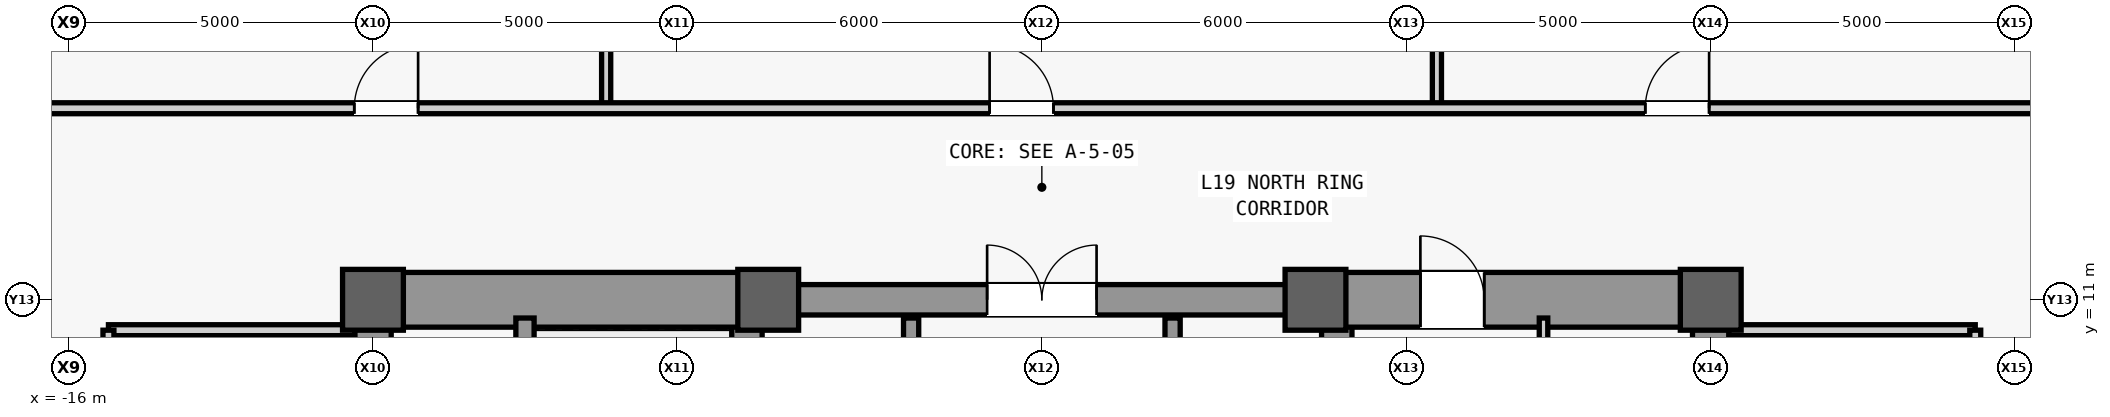
"""IFC4 building model, lengths in metres.
Left out: names, types, materials, properties, quantities, classifications, styles, units other than length and angle.
Written with IfcOpenShell. Run it as: python <this file> out.ifc"""

import sys

from ifc_helpers import new_model, si_unit, direction, frame, frame_2d, origin, origin_2d, place, context, subcontext, project, spatial, rectangle, extrude, source, transform, mapped, element, fill, save


model = new_model("IFC4")
c1 = context("Model", 3, precision=1e-05, world=origin(), true_north=direction((0.0, 1.0)))
c2 = subcontext(c1, "Body", "Model", "MODEL_VIEW")
j1 = project(units=[si_unit("LENGTHUNIT", "METRE"), si_unit("PLANEANGLEUNIT", "RADIAN")], contexts=[c1])
p1 = place(None, origin())
s1 = spatial("IfcSite", under=j1, at=p1, CompositionType="ELEMENT")
p2 = place(p1, origin())
s2 = spatial("IfcBuilding", under=s1, at=p2, CompositionType="ELEMENT")
p3 = place(p2, frame((0.0, 0.0, 87.2)))
s3 = spatial("IfcBuildingStorey", under=s2, at=p3, CompositionType="ELEMENT", Elevation=87.2)
m1 = source(origin(), c2, "Body", "SweptSolid", [
    extrude(rectangle(XDim=22.0, YDim=0.6, at=frame_2d((11.0, 0.0))), origin(), (0.0, 0.0, 1.0), 3.94),
])
p4 = place(p3, frame((-11.0, -11.0, 0.0), z_axis=(0.0, 0.0, 1.0), x_axis=(0.0, 1.0, 0.0)))
e1 = element("IfcWall", 1, at=p4, inside=s3, PredefinedType="SHEAR", context=c2, shape_type="MappedRepresentation", body=[
    mapped(m1, transform((0.0, 0.0, 0.0), scale=1.0)),
])
m2 = source(origin(), c2, "Body", "SweptSolid", [
    extrude(rectangle(XDim=1.1, YDim=2.2, at=frame_2d((0.55, 1.1))), frame((0.0, 0.31, 0.0), z_axis=(0.0, -1.0, 0.0), x_axis=(1.0, 0.0, 0.0)), (0.0, 0.0, 1.0), 0.62),
])
p5 = place(p4, frame((0.8, 0.0, 0.0)))
e2 = element("IfcOpeningElement", 2, at=p5, cuts=e1, PredefinedType="OPENING", context=c2, shape_type="MappedRepresentation", body=[
    mapped(m2, transform((0.0, 0.0, 0.0), scale=1.0)),
])
p6 = place(p4, frame((12.5, 0.0, 0.0)))
e3 = element("IfcOpeningElement", 3, at=p6, cuts=e1, PredefinedType="OPENING", context=c2, shape_type="MappedRepresentation", body=[
    mapped(m2, transform((0.0, 0.0, 0.0), scale=1.0)),
])
m3 = source(origin(), c2, "Body", "SweptSolid", [
    extrude(rectangle(XDim=0.9, YDim=2.15, at=frame_2d((0.45, 1.075))), frame((0.0, 0.31, 0.0), z_axis=(0.0, -1.0, 0.0), x_axis=(1.0, 0.0, 0.0)), (0.0, 0.0, 1.0), 0.62),
])
p7 = place(p4, frame((6.85, 0.0, 0.0)))
e4 = element("IfcOpeningElement", 4, at=p7, cuts=e1, PredefinedType="OPENING", context=c2, shape_type="MappedRepresentation", body=[
    mapped(m3, transform((0.0, 0.0, 0.0), scale=1.0)),
])
m4 = source(origin(), c2, "Body", "SweptSolid", [
    extrude(rectangle(XDim=1.3, YDim=2.3, at=frame_2d((0.65, 1.15))), frame((0.0, 0.31, 0.0), z_axis=(0.0, -1.0, 0.0), x_axis=(1.0, 0.0, 0.0)), (0.0, 0.0, 1.0), 0.62),
])
p8 = place(p4, frame((2.7, 0.0, 0.0)))
e5 = element("IfcOpeningElement", 5, at=p8, cuts=e1, PredefinedType="OPENING", context=c2, shape_type="MappedRepresentation", body=[
    mapped(m4, transform((0.0, 0.0, 0.0), scale=1.0)),
])
p9 = place(p3, frame((11.0, -11.0, 0.0), z_axis=(0.0, 0.0, 1.0), x_axis=(0.0, 1.0, 0.0)))
e6 = element("IfcWall", 6, at=p9, inside=s3, PredefinedType="SHEAR", context=c2, shape_type="MappedRepresentation", body=[
    mapped(m1, transform((0.0, 0.0, 0.0), scale=1.0)),
])
p10 = place(p9, frame((0.8, 0.0, 0.0)))
e7 = element("IfcOpeningElement", 7, at=p10, cuts=e6, PredefinedType="OPENING", context=c2, shape_type="MappedRepresentation", body=[
    mapped(m2, transform((0.0, 0.0, 0.0), scale=1.0)),
])
p11 = place(p9, frame((6.2, 0.0, 0.0)))
e8 = element("IfcOpeningElement", 8, at=p11, cuts=e6, PredefinedType="OPENING", context=c2, shape_type="MappedRepresentation", body=[
    mapped(m3, transform((0.0, 0.0, 0.0), scale=1.0)),
])
p12 = place(p9, frame((8.05, 0.0, 0.0)))
e9 = element("IfcOpeningElement", 9, at=p12, cuts=e6, PredefinedType="OPENING", context=c2, shape_type="MappedRepresentation", body=[
    mapped(m3, transform((0.0, 0.0, 0.0), scale=1.0)),
])
p13 = place(p9, frame((2.7, 0.0, 0.0)))
e10 = element("IfcOpeningElement", 10, at=p13, cuts=e6, PredefinedType="OPENING", context=c2, shape_type="MappedRepresentation", body=[
    mapped(m4, transform((0.0, 0.0, 0.0), scale=1.0)),
])
p14 = place(p9, frame((13.35, 0.0, 0.0)))
e11 = element("IfcOpeningElement", 11, at=p14, cuts=e6, PredefinedType="OPENING", context=c2, shape_type="MappedRepresentation", body=[
    mapped(m4, transform((0.0, 0.0, 0.0), scale=1.0)),
])
m5 = source(origin(), c2, "Body", "SweptSolid", [
    extrude(rectangle(XDim=21.4, YDim=0.5, at=frame_2d((10.7, 0.0))), origin(), (0.0, 0.0, 1.0), 3.94),
])
for number, where, z_axis, x_axis in (
    (12, (-4.85, -10.7, 0.0), (0.0, 0.0, 1.0), (0.0, 1.0, 0.0)),
    (13, (4.85, -10.7, 0.0), (0.0, 0.0, 1.0), (0.0, 1.0, 0.0)),
):
    element("IfcWall", number, at=place(p3, frame(where, z_axis=z_axis, x_axis=x_axis)), inside=s3, PredefinedType="SHEAR", context=c2, shape_type="MappedRepresentation", body=[
        mapped(m5, transform((0.0, 0.0, 0.0), scale=1.0)),
    ])
m6 = source(origin(), c2, "Body", "SweptSolid", [
    extrude(rectangle(XDim=5.85, YDim=0.9, at=frame_2d((2.925, 0.0))), origin(), (0.0, 0.0, 1.0), 3.94),
])
p15 = place(p3, frame((-10.7, 11.0, 0.0), z_axis=(0.0, 0.0, 1.0), x_axis=(1.0, 0.0, 0.0)))
e14 = element("IfcWall", 14, at=p15, inside=s3, PredefinedType="SHEAR", context=c2, shape_type="MappedRepresentation", body=[
    mapped(m6, transform((0.0, 0.0, 0.0), scale=1.0)),
])
p16 = place(p3, frame((4.85, 11.0, 0.0), z_axis=(0.0, 0.0, 1.0), x_axis=(1.0, 0.0, 0.0)))
e15 = element("IfcWall", 15, at=p16, inside=s3, PredefinedType="SHEAR", context=c2, shape_type="MappedRepresentation", body=[
    mapped(m6, transform((0.0, 0.0, 0.0), scale=1.0)),
])
m7 = source(origin(), c2, "Body", "SweptSolid", [
    extrude(rectangle(XDim=1.05, YDim=2.2, at=frame_2d((0.525, 1.1))), frame((0.0, 0.46, 0.0), z_axis=(0.0, -1.0, 0.0), x_axis=(1.0, 0.0, 0.0)), (0.0, 0.0, 1.0), 0.92),
])
p17 = place(p16, frame((1.375, 0.0, 0.0)))
e16 = element("IfcOpeningElement", 16, at=p17, cuts=e15, PredefinedType="OPENING", context=c2, shape_type="MappedRepresentation", body=[
    mapped(m7, transform((0.0, 0.0, 0.0), scale=1.0)),
])
m8 = source(origin(), c2, "Body", "SweptSolid", [
    extrude(rectangle(XDim=9.2, YDim=0.5, at=frame_2d((4.6, 0.0))), origin(), (0.0, 0.0, 1.0), 3.94),
])
p18 = place(p3, frame((-4.6, 11.0, 0.0), z_axis=(0.0, 0.0, 1.0), x_axis=(1.0, 0.0, 0.0)))
e17 = element("IfcWall", 17, at=p18, inside=s3, PredefinedType="SHEAR", context=c2, shape_type="MappedRepresentation", body=[
    mapped(m8, transform((0.0, 0.0, 0.0), scale=1.0)),
])
m9 = source(origin(), c2, "Body", "SweptSolid", [
    extrude(rectangle(XDim=1.8, YDim=2.25, at=frame_2d((0.9, 1.125))), frame((0.0, 0.26, 0.0), z_axis=(0.0, -1.0, 0.0), x_axis=(1.0, 0.0, 0.0)), (0.0, 0.0, 1.0), 0.52),
])
p19 = place(p18, frame((3.7, 0.0, 0.0)))
e18 = element("IfcOpeningElement", 18, at=p19, cuts=e17, PredefinedType="OPENING", context=c2, shape_type="MappedRepresentation", body=[
    mapped(m9, transform((0.0, 0.0, 0.0), scale=1.0)),
])
m10 = source(origin(), c2, "Body", "SweptSolid", [
    extrude(rectangle(XDim=1.0, YDim=1.0, at=origin_2d()), origin(), (0.0, 0.0, 1.0), 4.2),
])
for number, where, z_axis, x_axis in (
    (19, (-11.0, 11.0, 0.0), (0.0, 0.0, 1.0), (1.0, 0.0, 0.0)),
    (20, (-4.5, 11.0, 0.0), (0.0, 0.0, 1.0), (1.0, 0.0, 0.0)),
    (21, (4.5, 11.0, 0.0), (0.0, 0.0, 1.0), (1.0, 0.0, 0.0)),
    (22, (11.0, 11.0, 0.0), (0.0, 0.0, 1.0), (1.0, 0.0, 0.0)),
):
    element("IfcColumn", number, at=place(p3, frame(where, z_axis=z_axis, x_axis=x_axis)), inside=s3, PredefinedType="COLUMN", context=c2, shape_type="MappedRepresentation", body=[
        mapped(m10, transform((0.0, 0.0, 0.0), scale=1.0)),
    ])
m11 = source(origin(), c2, "Body", "SweptSolid", [
    extrude(rectangle(XDim=7.75, YDim=0.3, at=frame_2d((3.875, 0.0))), origin(), (0.0, 0.0, 1.0), 3.94),
])
p20 = place(p3, frame((-8.5, 2.95, 0.0), z_axis=(0.0, 0.0, 1.0), x_axis=(0.0, 1.0, 0.0)))
e23 = element("IfcWall", 23, at=p20, inside=s3, PredefinedType="SHEAR", context=c2, shape_type="MappedRepresentation", body=[
    mapped(m11, transform((0.0, 0.0, 0.0), scale=1.0)),
])
m12 = source(origin(), c2, "Body", "SweptSolid", [
    extrude(rectangle(XDim=9.4, YDim=0.14, at=frame_2d((4.7, 0.0))), origin(), (0.0, 0.0, 1.0), 3.94),
])
p21 = place(p3, frame((8.25, 1.3, 0.0), z_axis=(0.0, 0.0, 1.0), x_axis=(0.0, 1.0, 0.0)))
e24 = element("IfcWall", 24, at=p21, inside=s3, PredefinedType="PARTITIONING", context=c2, shape_type="MappedRepresentation", body=[
    mapped(m12, transform((0.0, 0.0, 0.0), scale=1.0)),
])
m13 = source(origin(), c2, "Body", "SweptSolid", [
    extrude(rectangle(XDim=4.05, YDim=0.18, at=frame_2d((2.025, 0.0))), origin(), (0.0, 0.0, 1.0), 3.94),
])
p22 = place(p3, frame((-15.35, 10.5, 0.0), z_axis=(0.0, 0.0, 1.0), x_axis=(1.0, 0.0, 0.0)))
e25 = element("IfcWall", 25, at=p22, inside=s3, PredefinedType="PARTITIONING", context=c2, shape_type="MappedRepresentation", body=[
    mapped(m13, transform((0.0, 0.0, 0.0), scale=1.0)),
])
m14 = source(origin(), c2, "Body", "SweptSolid", [
    extrude(rectangle(XDim=16.6, YDim=0.18, at=frame_2d((8.3, 0.0))), origin(), (0.0, 0.0, 1.0), 3.94),
])
p23 = place(p3, frame((-15.35, -6.1, 0.0), z_axis=(0.0, 0.0, 1.0), x_axis=(0.0, 1.0, 0.0)))
e26 = element("IfcWall", 26, at=p23, inside=s3, PredefinedType="PARTITIONING", context=c2, shape_type="MappedRepresentation", body=[
    mapped(m14, transform((0.0, 0.0, 0.0), scale=1.0)),
])
m15 = source(origin(), c2, "Body", "SweptSolid", [
    extrude(rectangle(XDim=1.8, YDim=2.25, at=frame_2d((0.9, 1.125))), frame((0.0, 0.1, 0.0), z_axis=(0.0, -1.0, 0.0), x_axis=(1.0, 0.0, 0.0)), (0.0, 0.0, 1.0), 0.2),
])
p24 = place(p23, frame((2.7, 0.0, 0.0)))
e27 = element("IfcOpeningElement", 27, at=p24, cuts=e26, PredefinedType="OPENING", context=c2, shape_type="MappedRepresentation", body=[
    mapped(m15, transform((0.0, 0.0, 0.0), scale=1.0)),
])
p25 = place(p23, frame((11.0, 0.0, 0.0)))
e28 = element("IfcOpeningElement", 28, at=p25, cuts=e26, PredefinedType="OPENING", context=c2, shape_type="MappedRepresentation", body=[
    mapped(m15, transform((0.0, 0.0, 0.0), scale=1.0)),
])
p26 = place(p3, frame((11.3, 10.5, 0.0), z_axis=(0.0, 0.0, 1.0), x_axis=(1.0, 0.0, 0.0)))
e29 = element("IfcWall", 29, at=p26, inside=s3, PredefinedType="PARTITIONING", context=c2, shape_type="MappedRepresentation", body=[
    mapped(m13, transform((0.0, 0.0, 0.0), scale=1.0)),
])
p27 = place(p3, frame((15.35, -6.1, 0.0), z_axis=(0.0, 0.0, 1.0), x_axis=(0.0, 1.0, 0.0)))
e30 = element("IfcWall", 30, at=p27, inside=s3, PredefinedType="PARTITIONING", context=c2, shape_type="MappedRepresentation", body=[
    mapped(m14, transform((0.0, 0.0, 0.0), scale=1.0)),
])
p28 = place(p27, frame((2.7, 0.0, 0.0)))
e31 = element("IfcOpeningElement", 31, at=p28, cuts=e30, PredefinedType="OPENING", context=c2, shape_type="MappedRepresentation", body=[
    mapped(m15, transform((0.0, 0.0, 0.0), scale=1.0)),
])
p29 = place(p27, frame((13.0, 0.0, 0.0)))
e32 = element("IfcOpeningElement", 32, at=p29, cuts=e30, PredefinedType="OPENING", context=c2, shape_type="MappedRepresentation", body=[
    mapped(m15, transform((0.0, 0.0, 0.0), scale=1.0)),
])
m16 = source(origin(), c2, "Body", "SweptSolid", [
    extrude(rectangle(XDim=5.4, YDim=0.25, at=frame_2d((2.7, 0.0))), origin(), (0.0, 0.0, 1.0), 3.94),
])
for number, where, z_axis, x_axis in (
    (33, (-2.15, 5.3, 0.0), (0.0, 0.0, 1.0), (0.0, 1.0, 0.0)),
    (34, (2.15, 5.3, 0.0), (0.0, 0.0, 1.0), (0.0, 1.0, 0.0)),
):
    element("IfcWall", number, at=place(p3, frame(where, z_axis=z_axis, x_axis=x_axis)), inside=s3, PredefinedType="SHEAR", context=c2, shape_type="MappedRepresentation", body=[
        mapped(m16, transform((0.0, 0.0, 0.0), scale=1.0)),
    ])
m17 = source(origin(), c2, "Body", "SweptSolid", [
    extrude(rectangle(XDim=17.85, YDim=0.15, at=frame_2d((8.925, 0.0))), origin(), (0.0, 0.0, 1.0), 3.94),
])
for number, where, z_axis, x_axis in (
    (35, (-7.165, 14.15, 0.0), (0.0, 0.0, 1.0), (0.0, 1.0, 0.0)),
    (36, (6.497, 14.15, 0.0), (0.0, 0.0, 1.0), (0.0, 1.0, 0.0)),
):
    element("IfcWall", number, at=place(p3, frame(where, z_axis=z_axis, x_axis=x_axis)), inside=s3, PredefinedType="PARTITIONING", context=c2, shape_type="MappedRepresentation", body=[
        mapped(m17, transform((0.0, 0.0, 0.0), scale=1.0)),
    ])
m18 = source(origin(), c2, "Body", "SweptSolid", [
    extrude(rectangle(XDim=37.95, YDim=0.18, at=frame_2d((18.975, 0.0))), origin(), (0.0, 0.0, 1.0), 3.94),
])
p30 = place(p3, frame((-18.55, 14.15, 0.0), z_axis=(0.0, 0.0, 1.0), x_axis=(1.0, 0.0, 0.0)))
e37 = element("IfcWall", 37, at=p30, inside=s3, PredefinedType="PARTITIONING", context=c2, shape_type="MappedRepresentation", body=[
    mapped(m18, transform((0.0, 0.0, 0.0), scale=1.0)),
])
m19 = source(origin(), c2, "Body", "SweptSolid", [
    extrude(rectangle(XDim=1.05, YDim=2.2, at=frame_2d((0.525, 1.1))), frame((0.0, 0.1, 0.0), z_axis=(0.0, -1.0, 0.0), x_axis=(1.0, 0.0, 0.0)), (0.0, 0.0, 1.0), 0.2),
])
p31 = place(p30, frame((7.242, 0.0, 0.0)))
e38 = element("IfcOpeningElement", 38, at=p31, cuts=e37, PredefinedType="OPENING", context=c2, shape_type="MappedRepresentation", body=[
    mapped(m19, transform((0.0, 0.0, 0.0), scale=1.0)),
])
p32 = place(p30, frame((17.691, 0.0, 0.0)))
e39 = element("IfcOpeningElement", 39, at=p32, cuts=e37, PredefinedType="OPENING", context=c2, shape_type="MappedRepresentation", body=[
    mapped(m19, transform((0.0, 0.0, 0.0), scale=1.0)),
])
p33 = place(p30, frame((28.473, 0.0, 0.0)))
e40 = element("IfcOpeningElement", 40, at=p33, cuts=e37, PredefinedType="OPENING", context=c2, shape_type="MappedRepresentation", body=[
    mapped(m19, transform((0.0, 0.0, 0.0), scale=1.0)),
])
m20 = source(origin(), c2, "Body", "SweptSolid", [
    extrude(rectangle(XDim=1.05, YDim=2.2, at=frame_2d((0.525, 1.1))), frame((0.0, 0.025, 0.0), z_axis=(0.0, -1.0, 0.0), x_axis=(1.0, 0.0, 0.0)), (0.0, 0.0, 1.0), 0.05),
])
p34 = place(p17, origin())
e41 = element("IfcDoor", 41, at=p34, inside=s3, OperationType="SINGLE_SWING_LEFT", PredefinedType="DOOR", context=c2, shape_type="MappedRepresentation", body=[
    mapped(m20, transform((0.0, 0.0, 0.0), scale=1.0)),
])
fill(e16, e41)
m21 = source(origin(), c2, "Body", "SweptSolid", [
    extrude(rectangle(XDim=1.8, YDim=2.25, at=frame_2d((0.9, 1.125))), frame((0.0, 0.025, 0.0), z_axis=(0.0, -1.0, 0.0), x_axis=(1.0, 0.0, 0.0)), (0.0, 0.0, 1.0), 0.05),
])
p35 = place(p19, origin())
e42 = element("IfcDoor", 42, at=p35, inside=s3, OperationType="SINGLE_SWING_RIGHT", PredefinedType="DOOR", context=c2, shape_type="MappedRepresentation", body=[
    mapped(m21, transform((0.0, 0.0, 0.0), scale=1.0)),
])
fill(e18, e42)
p36 = place(p31, origin())
e43 = element("IfcDoor", 43, at=p36, inside=s3, OperationType="SINGLE_SWING_RIGHT", PredefinedType="DOOR", context=c2, shape_type="MappedRepresentation", body=[
    mapped(m20, transform((0.0, 0.0, 0.0), scale=1.0)),
])
fill(e38, e43)
p37 = place(p32, origin())
e44 = element("IfcDoor", 44, at=p37, inside=s3, OperationType="SINGLE_SWING_LEFT", PredefinedType="DOOR", context=c2, shape_type="MappedRepresentation", body=[
    mapped(m20, transform((0.0, 0.0, 0.0), scale=1.0)),
])
fill(e39, e44)
p38 = place(p33, origin())
e45 = element("IfcDoor", 45, at=p38, inside=s3, OperationType="SINGLE_SWING_RIGHT", PredefinedType="DOOR", context=c2, shape_type="MappedRepresentation", body=[
    mapped(m20, transform((0.0, 0.0, 0.0), scale=1.0)),
])
fill(e40, e45)
save(model, sys.argv[1])
